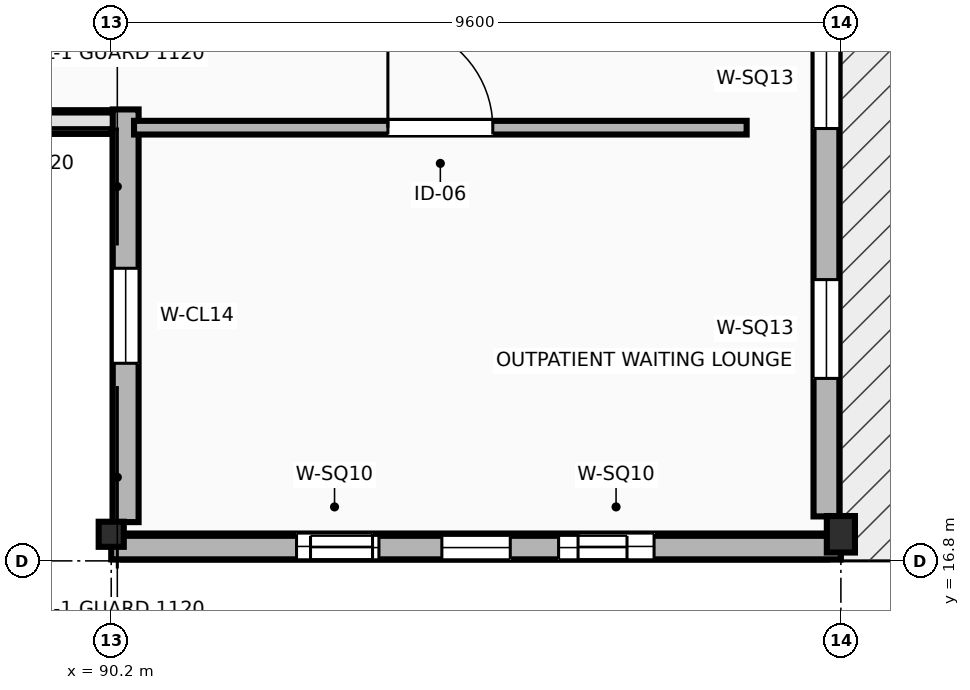
"""IFC4 building model, lengths in metres.
Left out: names, types, materials, properties, quantities, classifications, styles, units other than length and angle.
Written with IfcOpenShell. Run it as: python <this file> out.ifc"""

import sys

from ifc_helpers import new_model, si_unit, direction, frame, frame_2d, origin, origin_2d, place, context, subcontext, project, spatial, polyline, rectangle, outline, extrude, element, fill, save


model = new_model("IFC4")
c1 = context("Model", 3, precision=1e-05, world=origin(), true_north=direction((0.0, 1.0)))
c2 = subcontext(c1, "Body", "Model", "MODEL_VIEW")
j1 = project(units=[si_unit("LENGTHUNIT", "METRE"), si_unit("PLANEANGLEUNIT", "RADIAN")], contexts=[c1])
p1 = place(None, origin())
s1 = spatial("IfcSite", under=j1, at=p1, CompositionType="ELEMENT")
p2 = place(p1, origin())
s2 = spatial("IfcBuilding", under=s1, at=p2, CompositionType="ELEMENT")
p3 = place(p2, frame((0.0, 0.0, 22.2)))
s3 = spatial("IfcBuildingStorey", under=s2, at=p3, CompositionType="ELEMENT", Elevation=22.2)
p4 = place(p3, frame((90.2, 17.15, 0.0), z_axis=(0.0, 0.0, 1.0), x_axis=(1.0, 0.0, 0.0)))
e1 = element("IfcColumn", 1, at=p4, inside=s3, PredefinedType="COLUMN", context=c2, shape_type="SweptSolid", body=[
    extrude(rectangle(XDim=0.33, YDim=0.33, at=origin_2d()), origin(), (0.0, 0.0, 1.0), 4.2),
])
p5 = place(p3, frame((99.8, 17.15, 0.0), z_axis=(0.0, 0.0, 1.0), x_axis=(1.0, 0.0, 0.0)))
e2 = element("IfcColumn", 2, at=p5, inside=s3, PredefinedType="COLUMN", context=c2, shape_type="SweptSolid", body=[
    extrude(rectangle(XDim=0.37, YDim=0.48, at=origin_2d()), origin(), (0.0, 0.0, 1.0), 4.2),
])
p6 = place(p3, frame((90.39, 22.74, 0.0), z_axis=(0.0, 0.0, 1.0), x_axis=(0.0, -1.0, 0.0)))
e3 = element("IfcWall", 3, at=p6, inside=s3, PredefinedType="STANDARD", context=c2, shape_type="SweptSolid", body=[
    extrude(rectangle(XDim=5.43, YDim=0.34, at=frame_2d((2.715, 0.0))), origin(), (0.0, 0.0, 1.0), 3.035),
])
p7 = place(p6, frame((2.09, 0.0, 0.95)))
e4 = element("IfcOpeningElement", 4, at=p7, cuts=e3, PredefinedType="OPENING", context=c2, shape_type="SweptSolid", body=[
    extrude(rectangle(XDim=1.25, YDim=1.55, at=frame_2d((0.625, 0.775))), frame((0.0, 0.18, 0.0), z_axis=(0.0, -1.0, 0.0), x_axis=(1.0, 0.0, 0.0)), (0.0, 0.0, 1.0), 0.36),
])
p8 = place(p3, frame((90.36, 16.99, 0.0), z_axis=(0.0, 0.0, 1.0), x_axis=(1.0, 0.0, 0.0)))
e5 = element("IfcWall", 5, at=p8, inside=s3, PredefinedType="STANDARD", context=c2, shape_type="SweptSolid", body=[
    extrude(rectangle(XDim=9.26, YDim=0.34, at=frame_2d((4.63, 0.0))), origin(), (0.0, 0.0, 1.0), 3.92),
])
p9 = place(p8, frame((2.278, 0.0, 1.15)))
e6 = element("IfcOpeningElement", 6, at=p9, cuts=e5, PredefinedType="OPENING", context=c2, shape_type="SweptSolid", body=[
    extrude(rectangle(XDim=1.0, YDim=1.0, at=frame_2d((0.5, 0.5))), frame((0.0, 0.18, 0.0), z_axis=(0.0, -1.0, 0.0), x_axis=(1.0, 0.0, 0.0)), (0.0, 0.0, 1.0), 0.36),
])
p10 = place(p8, frame((5.982, 0.0, 1.15)))
e7 = element("IfcOpeningElement", 7, at=p10, cuts=e5, PredefinedType="OPENING", context=c2, shape_type="SweptSolid", body=[
    extrude(rectangle(XDim=1.0, YDim=1.0, at=frame_2d((0.5, 0.5))), frame((0.0, 0.18, 0.0), z_axis=(0.0, -1.0, 0.0), x_axis=(1.0, 0.0, 0.0)), (0.0, 0.0, 1.0), 0.36),
])
p11 = place(p3, frame((99.61, 17.385, 0.0), z_axis=(0.0, 0.0, 1.0), x_axis=(0.0, 1.0, 0.0)))
e8 = element("IfcWall", 8, at=p11, inside=s3, PredefinedType="STANDARD", context=c2, shape_type="SweptSolid", body=[
    extrude(rectangle(XDim=8.22, YDim=0.34, at=frame_2d((4.11, 0.0))), origin(), (0.0, 0.0, 1.0), 3.035),
])
p12 = place(p11, frame((1.816, 0.0, 1.15)))
e9 = element("IfcOpeningElement", 9, at=p12, cuts=e8, PredefinedType="OPENING", context=c2, shape_type="SweptSolid", body=[
    extrude(rectangle(XDim=1.3, YDim=1.3, at=frame_2d((0.65, 0.65))), frame((0.0, 0.18, 0.0), z_axis=(0.0, -1.0, 0.0), x_axis=(1.0, 0.0, 0.0)), (0.0, 0.0, 1.0), 0.36),
])
p13 = place(p11, frame((5.104, 0.0, 1.15)))
e10 = element("IfcOpeningElement", 10, at=p13, cuts=e8, PredefinedType="OPENING", context=c2, shape_type="SweptSolid", body=[
    extrude(rectangle(XDim=1.3, YDim=1.3, at=frame_2d((0.65, 0.65))), frame((0.0, 0.18, 0.0), z_axis=(0.0, -1.0, 0.0), x_axis=(1.0, 0.0, 0.0)), (0.0, 0.0, 1.0), 0.36),
])
p14 = place(p3, frame((80.6, 22.575, 4.2), z_axis=(0.0, 0.0, 1.0), x_axis=(1.0, 0.0, 0.0)))
e11 = element("IfcWall", 11, at=p14, inside=s3, PredefinedType="STANDARD", context=c2, shape_type="SweptSolid", body=[
    extrude(outline(polyline([(0.0, 0.0), (9.6, 0.0), (9.6, 0.0), (4.8, 7.99), (0.0, 0.0), (0.0, 0.0)])), frame((0.0, 0.155, 0.0), z_axis=(0.0, -1.0, 0.0), x_axis=(1.0, 0.0, 0.0)), (0.0, 0.0, 1.0), 0.31),
])
p15 = place(p14, frame((2.572, 0.0, 0.75)))
e12 = element("IfcOpeningElement", 12, at=p15, cuts=e11, PredefinedType="OPENING", context=c2, shape_type="SweptSolid", body=[
    extrude(rectangle(XDim=1.0, YDim=1.0, at=frame_2d((0.5, 0.5))), frame((0.0, 0.165, 0.0), z_axis=(0.0, -1.0, 0.0), x_axis=(1.0, 0.0, 0.0)), (0.0, 0.0, 1.0), 0.33),
])
p16 = place(p14, frame((5.836, 0.0, 1.55)))
e13 = element("IfcOpeningElement", 13, at=p16, cuts=e11, PredefinedType="OPENING", context=c2, shape_type="SweptSolid", body=[
    extrude(rectangle(XDim=1.0, YDim=1.0, at=frame_2d((0.5, 0.5))), frame((0.0, 0.165, 0.0), z_axis=(0.0, -1.0, 0.0), x_axis=(1.0, 0.0, 0.0)), (0.0, 0.0, 1.0), 0.33),
])
p17 = place(p14, frame((4.3, 0.0, 3.35)))
e14 = element("IfcOpeningElement", 14, at=p17, cuts=e11, PredefinedType="OPENING", context=c2, shape_type="SweptSolid", body=[
    extrude(rectangle(XDim=1.0, YDim=1.0, at=frame_2d((0.5, 0.5))), frame((0.0, 0.165, 0.0), z_axis=(0.0, -1.0, 0.0), x_axis=(1.0, 0.0, 0.0)), (0.0, 0.0, 1.0), 0.33),
])
p18 = place(p3, frame((90.2, 16.975, 4.2), z_axis=(0.0, 0.0, 1.0), x_axis=(1.0, 0.0, 0.0)))
e15 = element("IfcWall", 15, at=p18, inside=s3, PredefinedType="STANDARD", context=c2, shape_type="SweptSolid", body=[
    extrude(outline(polyline([(0.0, 0.0), (9.6, 0.0), (9.6, 0.0), (4.8, 8.79), (0.0, 0.0), (0.0, 0.0)])), frame((0.0, 0.155, 0.0), z_axis=(0.0, -1.0, 0.0), x_axis=(1.0, 0.0, 0.0)), (0.0, 0.0, 1.0), 0.31),
])
p19 = place(p18, frame((2.622, 0.0, 0.75)))
e16 = element("IfcOpeningElement", 16, at=p19, cuts=e15, PredefinedType="OPENING", context=c2, shape_type="SweptSolid", body=[
    extrude(rectangle(XDim=0.9, YDim=0.9, at=frame_2d((0.45, 0.45))), frame((0.0, 0.165, 0.0), z_axis=(0.0, -1.0, 0.0), x_axis=(1.0, 0.0, 0.0)), (0.0, 0.0, 1.0), 0.33),
])
p20 = place(p18, frame((5.886, 0.0, 1.55)))
e17 = element("IfcOpeningElement", 17, at=p20, cuts=e15, PredefinedType="OPENING", context=c2, shape_type="SweptSolid", body=[
    extrude(rectangle(XDim=0.9, YDim=0.9, at=frame_2d((0.45, 0.45))), frame((0.0, 0.165, 0.0), z_axis=(0.0, -1.0, 0.0), x_axis=(1.0, 0.0, 0.0)), (0.0, 0.0, 1.0), 0.33),
])
p21 = place(p18, frame((4.35, 0.0, 3.35)))
e18 = element("IfcOpeningElement", 18, at=p21, cuts=e15, PredefinedType="OPENING", context=c2, shape_type="SweptSolid", body=[
    extrude(rectangle(XDim=0.9, YDim=0.9, at=frame_2d((0.45, 0.45))), frame((0.0, 0.165, 0.0), z_axis=(0.0, -1.0, 0.0), x_axis=(1.0, 0.0, 0.0)), (0.0, 0.0, 1.0), 0.33),
])
p22 = place(p3, frame((90.5, 22.5, 0.0), z_axis=(0.0, 0.0, 1.0), x_axis=(1.0, 0.0, 0.0)))
e19 = element("IfcWall", 19, at=p22, inside=s3, PredefinedType="PARTITIONING", context=c2, shape_type="SweptSolid", body=[
    extrude(rectangle(XDim=8.06, YDim=0.18, at=frame_2d((4.03, 0.0))), origin(), (0.0, 0.0, 1.0), 3.92),
])
p23 = place(p22, frame((3.34, 0.0, 0.0)))
e20 = element("IfcOpeningElement", 20, at=p23, cuts=e19, PredefinedType="OPENING", context=c2, shape_type="SweptSolid", body=[
    extrude(rectangle(XDim=1.38, YDim=2.25, at=frame_2d((0.69, 1.125))), frame((0.0, 0.1, 0.0), z_axis=(0.0, -1.0, 0.0), x_axis=(1.0, 0.0, 0.0)), (0.0, 0.0, 1.0), 0.2),
])
p24 = place(p7, origin())
e21 = element("IfcWindow", 21, at=p24, inside=s3, PartitioningType="SINGLE_PANEL", PredefinedType="WINDOW", context=c2, shape_type="SweptSolid", body=[
    extrude(rectangle(XDim=1.25, YDim=1.55, at=frame_2d((0.625, 0.775))), frame((0.0, 0.03, 0.0), z_axis=(0.0, -1.0, 0.0), x_axis=(1.0, 0.0, 0.0)), (0.0, 0.0, 1.0), 0.06),
])
fill(e4, e21)
p25 = place(p9, origin())
e22 = element("IfcWindow", 22, at=p25, inside=s3, PartitioningType="SINGLE_PANEL", PredefinedType="WINDOW", context=c2, shape_type="SweptSolid", body=[
    extrude(rectangle(XDim=1.0, YDim=1.0, at=frame_2d((0.5, 0.5))), frame((0.0, 0.03, 0.0), z_axis=(0.0, -1.0, 0.0), x_axis=(1.0, 0.0, 0.0)), (0.0, 0.0, 1.0), 0.06),
])
fill(e6, e22)
p26 = place(p10, origin())
e23 = element("IfcWindow", 23, at=p26, inside=s3, PartitioningType="SINGLE_PANEL", PredefinedType="WINDOW", context=c2, shape_type="SweptSolid", body=[
    extrude(rectangle(XDim=1.0, YDim=1.0, at=frame_2d((0.5, 0.5))), frame((0.0, 0.03, 0.0), z_axis=(0.0, -1.0, 0.0), x_axis=(1.0, 0.0, 0.0)), (0.0, 0.0, 1.0), 0.06),
])
fill(e7, e23)
p27 = place(p12, origin())
e24 = element("IfcWindow", 24, at=p27, inside=s3, PartitioningType="SINGLE_PANEL", PredefinedType="WINDOW", context=c2, shape_type="SweptSolid", body=[
    extrude(rectangle(XDim=1.3, YDim=1.3, at=frame_2d((0.65, 0.65))), frame((0.0, 0.03, 0.0), z_axis=(0.0, -1.0, 0.0), x_axis=(1.0, 0.0, 0.0)), (0.0, 0.0, 1.0), 0.06),
])
fill(e9, e24)
p28 = place(p13, origin())
e25 = element("IfcWindow", 25, at=p28, inside=s3, PartitioningType="SINGLE_PANEL", PredefinedType="WINDOW", context=c2, shape_type="SweptSolid", body=[
    extrude(rectangle(XDim=1.3, YDim=1.3, at=frame_2d((0.65, 0.65))), frame((0.0, 0.03, 0.0), z_axis=(0.0, -1.0, 0.0), x_axis=(1.0, 0.0, 0.0)), (0.0, 0.0, 1.0), 0.06),
])
fill(e10, e25)
p29 = place(p19, origin())
e26 = element("IfcWindow", 26, at=p29, inside=s3, PartitioningType="SINGLE_PANEL", PredefinedType="WINDOW", context=c2, shape_type="SweptSolid", body=[
    extrude(rectangle(XDim=0.9, YDim=0.9, at=frame_2d((0.45, 0.45))), frame((0.0, 0.03, 0.0), z_axis=(0.0, -1.0, 0.0), x_axis=(1.0, 0.0, 0.0)), (0.0, 0.0, 1.0), 0.06),
])
fill(e16, e26)
p30 = place(p20, origin())
e27 = element("IfcWindow", 27, at=p30, inside=s3, PartitioningType="SINGLE_PANEL", PredefinedType="WINDOW", context=c2, shape_type="SweptSolid", body=[
    extrude(rectangle(XDim=0.9, YDim=0.9, at=frame_2d((0.45, 0.45))), frame((0.0, 0.03, 0.0), z_axis=(0.0, -1.0, 0.0), x_axis=(1.0, 0.0, 0.0)), (0.0, 0.0, 1.0), 0.06),
])
fill(e17, e27)
p31 = place(p21, origin())
e28 = element("IfcWindow", 28, at=p31, inside=s3, PartitioningType="SINGLE_PANEL", PredefinedType="WINDOW", context=c2, shape_type="SweptSolid", body=[
    extrude(rectangle(XDim=0.9, YDim=0.9, at=frame_2d((0.45, 0.45))), frame((0.0, 0.03, 0.0), z_axis=(0.0, -1.0, 0.0), x_axis=(1.0, 0.0, 0.0)), (0.0, 0.0, 1.0), 0.06),
])
fill(e18, e28)
p32 = place(p23, origin())
e29 = element("IfcDoor", 29, at=p32, inside=s3, OperationType="SINGLE_SWING_LEFT", PredefinedType="DOOR", context=c2, shape_type="SweptSolid", body=[
    extrude(rectangle(XDim=1.38, YDim=2.25, at=frame_2d((0.69, 1.125))), frame((0.0, 0.025, 0.0), z_axis=(0.0, -1.0, 0.0), x_axis=(1.0, 0.0, 0.0)), (0.0, 0.0, 1.0), 0.05),
])
fill(e20, e29)
save(model, sys.argv[1])
